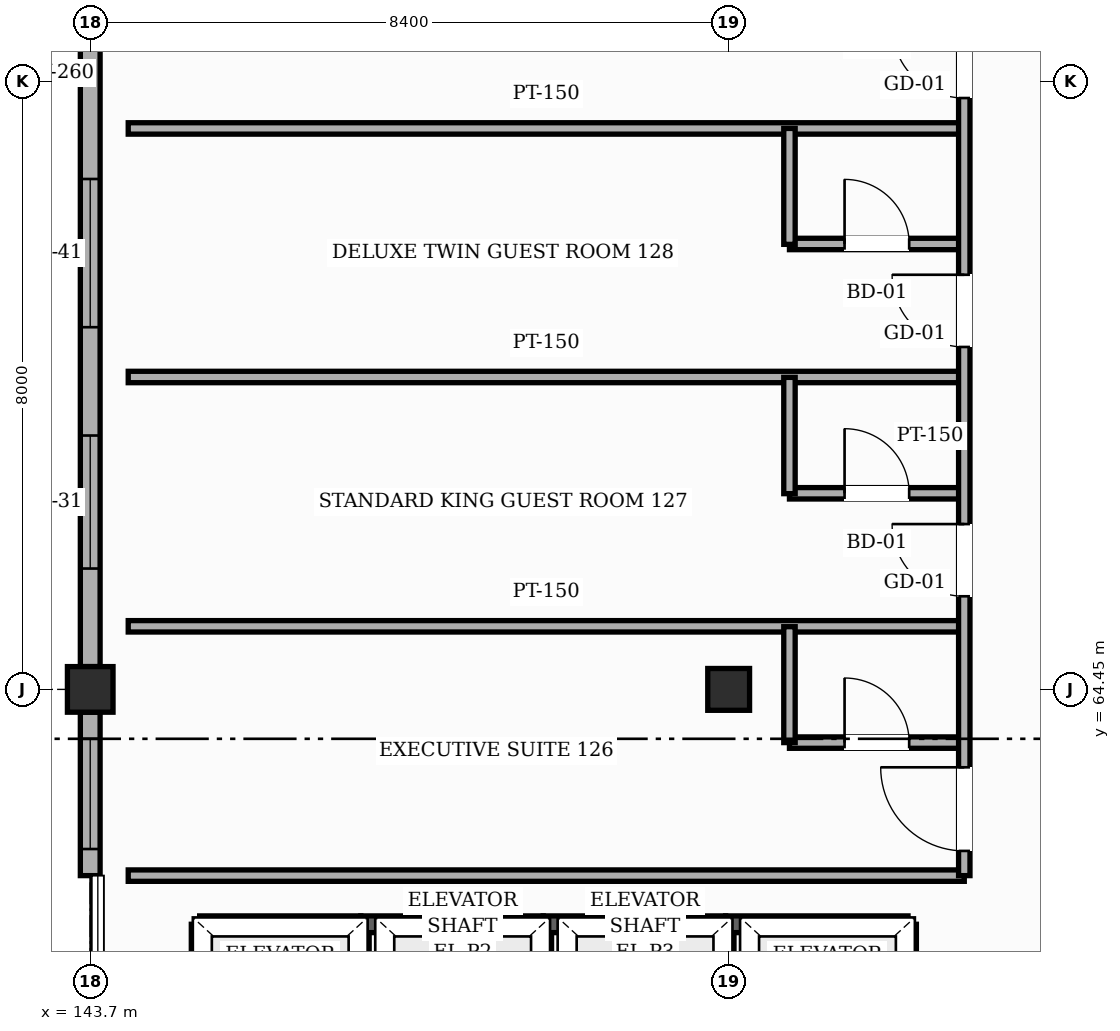
"""IFC4 building model, lengths in metres.
Left out: names, types, materials, properties, quantities, classifications, styles, units other than length and angle.
Written with IfcOpenShell. Run it as: python <this file> out.ifc"""

import sys

from ifc_helpers import new_model, si_unit, direction, frame, frame_2d, origin, origin_2d, place, context, subcontext, project, spatial, rectangle, hollow_rectangle, extrude, element, fill, save


model = new_model("IFC4")
c1 = context("Model", 3, precision=1e-05, world=origin(), true_north=direction((0.0, 1.0)))
c2 = subcontext(c1, "Body", "Model", "MODEL_VIEW")
j1 = project(units=[si_unit("LENGTHUNIT", "METRE"), si_unit("PLANEANGLEUNIT", "RADIAN")], contexts=[c1])
p1 = place(None, origin())
s1 = spatial("IfcSite", under=j1, at=p1, CompositionType="ELEMENT")
p2 = place(p1, origin())
s2 = spatial("IfcBuilding", under=s1, at=p2, CompositionType="ELEMENT")
p3 = place(p2, frame((0.0, 0.0, 28.2)))
s3 = spatial("IfcBuildingStorey", under=s2, at=p3, CompositionType="ELEMENT", Elevation=28.2)
p4 = place(p3, frame((143.7, 64.45, 0.0), z_axis=(0.0, 0.0, 1.0), x_axis=(1.0, 0.0, 0.0)))
e1 = element("IfcColumn", 1, at=p4, inside=s3, PredefinedType="COLUMN", context=c2, shape_type="SweptSolid", body=[
    extrude(hollow_rectangle(XDim=0.6, YDim=0.6, WallThickness=0.025, InnerFilletRadius=0.025, OuterFilletRadius=0.05, at=origin_2d()), origin(), (0.0, 0.0, 1.0), 3.6),
])
p5 = place(p3, frame((152.1, 64.45, 0.0), z_axis=(0.0, 0.0, 1.0), x_axis=(1.0, 0.0, 0.0)))
e2 = element("IfcColumn", 2, at=p5, inside=s3, PredefinedType="COLUMN", context=c2, shape_type="SweptSolid", body=[
    extrude(hollow_rectangle(XDim=0.55, YDim=0.55, WallThickness=0.022, InnerFilletRadius=0.022, OuterFilletRadius=0.044, at=origin_2d()), origin(), (0.0, 0.0, 1.0), 3.6),
])
p6 = place(p3, frame((143.7, 62.0, 0.0), z_axis=(0.0, 0.0, 1.0), x_axis=(0.0, 1.0, 0.0)))
e3 = element("IfcWall", 3, at=p6, inside=s3, PredefinedType="SOLIDWALL", context=c2, shape_type="SweptSolid", body=[
    extrude(rectangle(XDim=2.15, YDim=0.26, at=frame_2d((1.075, 0.0))), origin(), (0.0, 0.0, 1.0), 2.805),
])
p7 = place(p6, frame((0.35, 0.0, 0.85)))
e4 = element("IfcOpeningElement", 4, at=p7, cuts=e3, PredefinedType="OPENING", context=c2, shape_type="SweptSolid", body=[
    extrude(rectangle(XDim=1.45, YDim=1.65, at=frame_2d((0.725, 0.825))), frame((0.0, 0.14, 0.0), z_axis=(0.0, -1.0, 0.0), x_axis=(1.0, 0.0, 0.0)), (0.0, 0.0, 1.0), 0.28),
])
p8 = place(p3, frame((143.7, 64.75, 0.0), z_axis=(0.0, 0.0, 1.0), x_axis=(0.0, 1.0, 0.0)))
e5 = element("IfcWall", 5, at=p8, inside=s3, PredefinedType="SOLIDWALL", context=c2, shape_type="SweptSolid", body=[
    extrude(rectangle(XDim=8.3, YDim=0.26, at=frame_2d((4.15, 0.0))), origin(), (0.0, 0.0, 1.0), 2.655),
])
p9 = place(p8, frame((1.29, 0.0, 0.85)))
e6 = element("IfcOpeningElement", 6, at=p9, cuts=e5, PredefinedType="OPENING", context=c2, shape_type="SweptSolid", body=[
    extrude(rectangle(XDim=1.75, YDim=1.35, at=frame_2d((0.875, 0.675))), frame((0.0, 0.14, 0.0), z_axis=(0.0, -1.0, 0.0), x_axis=(1.0, 0.0, 0.0)), (0.0, 0.0, 1.0), 0.28),
])
p10 = place(p8, frame((4.465, 0.0, 0.85)))
e7 = element("IfcOpeningElement", 7, at=p10, cuts=e5, PredefinedType="OPENING", context=c2, shape_type="SweptSolid", body=[
    extrude(rectangle(XDim=1.95, YDim=1.35, at=frame_2d((0.975, 0.675))), frame((0.0, 0.14, 0.0), z_axis=(0.0, -1.0, 0.0), x_axis=(1.0, 0.0, 0.0)), (0.0, 0.0, 1.0), 0.28),
])
p11 = place(p3, frame((145.14, 61.36, 0.0), z_axis=(0.0, 0.0, 1.0), x_axis=(1.0, 0.0, 0.0)))
e8 = element("IfcWall", 8, at=p11, inside=s3, PredefinedType="SHEAR", context=c2, shape_type="SweptSolid", body=[
    extrude(rectangle(XDim=2.12, YDim=0.22, at=frame_2d((1.06, 0.0))), origin(), (0.0, 0.0, 1.0), 3.38),
])
for number, where, z_axis, x_axis in (
    (9, (147.26, 59.44, 0.0), (0.0, 0.0, 1.0), (0.0, 1.0, 0.0)),
    (10, (145.14, 59.44, 0.0), (0.0, 0.0, 1.0), (0.0, 1.0, 0.0)),
):
    element("IfcWall", number, at=place(p3, frame(where, z_axis=z_axis, x_axis=x_axis)), inside=s3, PredefinedType="SHEAR", context=c2, shape_type="SweptSolid", body=[
        extrude(rectangle(XDim=1.92, YDim=0.22, at=frame_2d((0.96, 0.0))), origin(), (0.0, 0.0, 1.0), 3.38),
    ])
p12 = place(p3, frame((147.26, 61.36, 0.0), z_axis=(0.0, 0.0, 1.0), x_axis=(1.0, 0.0, 0.0)))
e11 = element("IfcWall", 11, at=p12, inside=s3, PredefinedType="SHEAR", context=c2, shape_type="SweptSolid", body=[
    extrude(rectangle(XDim=2.4, YDim=0.22, at=frame_2d((1.2, 0.0))), origin(), (0.0, 0.0, 1.0), 3.38),
])
p13 = place(p3, frame((149.66, 59.44, 0.0), z_axis=(0.0, 0.0, 1.0), x_axis=(0.0, 1.0, 0.0)))
e12 = element("IfcWall", 12, at=p13, inside=s3, PredefinedType="SHEAR", context=c2, shape_type="SweptSolid", body=[
    extrude(rectangle(XDim=1.92, YDim=0.22, at=frame_2d((0.96, 0.0))), origin(), (0.0, 0.0, 1.0), 3.38),
])
p14 = place(p3, frame((149.66, 61.36, 0.0), z_axis=(0.0, 0.0, 1.0), x_axis=(1.0, 0.0, 0.0)))
e13 = element("IfcWall", 13, at=p14, inside=s3, PredefinedType="SHEAR", context=c2, shape_type="SweptSolid", body=[
    extrude(rectangle(XDim=2.4, YDim=0.22, at=frame_2d((1.2, 0.0))), origin(), (0.0, 0.0, 1.0), 3.38),
])
p15 = place(p3, frame((152.06, 59.44, 0.0), z_axis=(0.0, 0.0, 1.0), x_axis=(0.0, 1.0, 0.0)))
e14 = element("IfcWall", 14, at=p15, inside=s3, PredefinedType="SHEAR", context=c2, shape_type="SweptSolid", body=[
    extrude(rectangle(XDim=1.92, YDim=0.22, at=frame_2d((0.96, 0.0))), origin(), (0.0, 0.0, 1.0), 3.38),
])
p16 = place(p3, frame((152.06, 61.36, 0.0), z_axis=(0.0, 0.0, 1.0), x_axis=(1.0, 0.0, 0.0)))
e15 = element("IfcWall", 15, at=p16, inside=s3, PredefinedType="SHEAR", context=c2, shape_type="SweptSolid", body=[
    extrude(rectangle(XDim=2.4, YDim=0.22, at=frame_2d((1.2, 0.0))), origin(), (0.0, 0.0, 1.0), 3.38),
])
p17 = place(p3, frame((154.46, 59.44, 0.0), z_axis=(0.0, 0.0, 1.0), x_axis=(0.0, 1.0, 0.0)))
e16 = element("IfcWall", 16, at=p17, inside=s3, PredefinedType="SHEAR", context=c2, shape_type="SweptSolid", body=[
    extrude(rectangle(XDim=1.92, YDim=0.22, at=frame_2d((0.96, 0.0))), origin(), (0.0, 0.0, 1.0), 3.38),
])
p18 = place(p3, frame((144.2, 62.0, 0.0), z_axis=(0.0, 0.0, 1.0), x_axis=(1.0, 0.0, 0.0)))
e17 = element("IfcWall", 17, at=p18, inside=s3, PredefinedType="PARTITIONING", context=c2, shape_type="SweptSolid", body=[
    extrude(rectangle(XDim=11.0, YDim=0.15, at=frame_2d((5.5, 0.0))), origin(), (0.0, 0.0, 1.0), 3.365),
])
p19 = place(p3, frame((152.9, 63.75, 0.0), z_axis=(0.0, 0.0, 1.0), x_axis=(1.0, 0.0, 0.0)))
e18 = element("IfcWall", 18, at=p19, inside=s3, PredefinedType="PARTITIONING", context=c2, shape_type="SweptSolid", body=[
    extrude(rectangle(XDim=2.3, YDim=0.15, at=frame_2d((1.15, 0.0))), origin(), (0.0, 0.0, 1.0), 3.365),
])
p20 = place(p19, frame((0.725, 0.0, 0.0)))
e19 = element("IfcOpeningElement", 19, at=p20, cuts=e18, PredefinedType="OPENING", context=c2, shape_type="SweptSolid", body=[
    extrude(rectangle(XDim=0.85, YDim=2.1, at=frame_2d((0.425, 1.05))), frame((0.0, 0.085, 0.0), z_axis=(0.0, -1.0, 0.0), x_axis=(1.0, 0.0, 0.0)), (0.0, 0.0, 1.0), 0.17),
])
p21 = place(p3, frame((144.2, 65.28, 0.0), z_axis=(0.0, 0.0, 1.0), x_axis=(1.0, 0.0, 0.0)))
e20 = element("IfcWall", 20, at=p21, inside=s3, PredefinedType="PARTITIONING", context=c2, shape_type="SweptSolid", body=[
    extrude(rectangle(XDim=11.0, YDim=0.15, at=frame_2d((5.5, 0.0))), origin(), (0.0, 0.0, 1.0), 3.365),
])
p22 = place(p3, frame((152.9, 67.03, 0.0), z_axis=(0.0, 0.0, 1.0), x_axis=(1.0, 0.0, 0.0)))
e21 = element("IfcWall", 21, at=p22, inside=s3, PredefinedType="PARTITIONING", context=c2, shape_type="SweptSolid", body=[
    extrude(rectangle(XDim=2.3, YDim=0.15, at=frame_2d((1.15, 0.0))), origin(), (0.0, 0.0, 1.0), 3.365),
])
p23 = place(p22, frame((0.725, 0.0, 0.0)))
e22 = element("IfcOpeningElement", 22, at=p23, cuts=e21, PredefinedType="OPENING", context=c2, shape_type="SweptSolid", body=[
    extrude(rectangle(XDim=0.85, YDim=2.1, at=frame_2d((0.425, 1.05))), frame((0.0, 0.085, 0.0), z_axis=(0.0, -1.0, 0.0), x_axis=(1.0, 0.0, 0.0)), (0.0, 0.0, 1.0), 0.17),
])
p24 = place(p3, frame((144.2, 68.56, 0.0), z_axis=(0.0, 0.0, 1.0), x_axis=(1.0, 0.0, 0.0)))
e23 = element("IfcWall", 23, at=p24, inside=s3, PredefinedType="PARTITIONING", context=c2, shape_type="SweptSolid", body=[
    extrude(rectangle(XDim=11.0, YDim=0.15, at=frame_2d((5.5, 0.0))), origin(), (0.0, 0.0, 1.0), 3.365),
])
p25 = place(p3, frame((152.9, 70.31, 0.0), z_axis=(0.0, 0.0, 1.0), x_axis=(1.0, 0.0, 0.0)))
e24 = element("IfcWall", 24, at=p25, inside=s3, PredefinedType="PARTITIONING", context=c2, shape_type="SweptSolid", body=[
    extrude(rectangle(XDim=2.3, YDim=0.15, at=frame_2d((1.15, 0.0))), origin(), (0.0, 0.0, 1.0), 3.365),
])
p26 = place(p25, frame((0.725, 0.0, 0.0)))
e25 = element("IfcOpeningElement", 25, at=p26, cuts=e24, PredefinedType="OPENING", context=c2, shape_type="SweptSolid", body=[
    extrude(rectangle(XDim=0.85, YDim=2.1, at=frame_2d((0.425, 1.05))), frame((0.0, 0.085, 0.0), z_axis=(0.0, -1.0, 0.0), x_axis=(1.0, 0.0, 0.0)), (0.0, 0.0, 1.0), 0.17),
])
p27 = place(p3, frame((144.2, 71.83, 0.0), z_axis=(0.0, 0.0, 1.0), x_axis=(1.0, 0.0, 0.0)))
e26 = element("IfcWall", 26, at=p27, inside=s3, PredefinedType="PARTITIONING", context=c2, shape_type="SweptSolid", body=[
    extrude(rectangle(XDim=11.0, YDim=0.15, at=frame_2d((5.5, 0.0))), origin(), (0.0, 0.0, 1.0), 3.365),
])
p28 = place(p3, frame((152.9, 63.75, 0.0), z_axis=(0.0, 0.0, 1.0), x_axis=(0.0, 1.0, 0.0)))
e27 = element("IfcWall", 27, at=p28, inside=s3, PredefinedType="PARTITIONING", context=c2, shape_type="SweptSolid", body=[
    extrude(rectangle(XDim=1.525, YDim=0.15, at=frame_2d((0.762, 0.0))), origin(), (0.0, 0.0, 1.0), 3.365),
])
p29 = place(p3, frame((152.9, 67.025, 0.0), z_axis=(0.0, 0.0, 1.0), x_axis=(0.0, 1.0, 0.0)))
e28 = element("IfcWall", 28, at=p29, inside=s3, PredefinedType="PARTITIONING", context=c2, shape_type="SweptSolid", body=[
    extrude(rectangle(XDim=1.53, YDim=0.15, at=frame_2d((0.765, 0.0))), origin(), (0.0, 0.0, 1.0), 3.365),
])
p30 = place(p3, frame((152.9, 70.305, 0.0), z_axis=(0.0, 0.0, 1.0), x_axis=(0.0, 1.0, 0.0)))
e29 = element("IfcWall", 29, at=p30, inside=s3, PredefinedType="PARTITIONING", context=c2, shape_type="SweptSolid", body=[
    extrude(rectangle(XDim=1.525, YDim=0.15, at=frame_2d((0.763, 0.0))), origin(), (0.0, 0.0, 1.0), 3.365),
])
p31 = place(p3, frame((155.2, 62.0, 0.0), z_axis=(0.0, 0.0, 1.0), x_axis=(0.0, 1.0, 0.0)))
e30 = element("IfcWall", 30, at=p31, inside=s3, PredefinedType="PARTITIONING", context=c2, shape_type="SweptSolid", body=[
    extrude(rectangle(XDim=42.6, YDim=0.15, at=frame_2d((21.3, 0.0))), origin(), (0.0, 0.0, 1.0), 3.365),
])
p32 = place(p31, frame((0.325, 0.0, 0.0)))
e31 = element("IfcOpeningElement", 31, at=p32, cuts=e30, PredefinedType="OPENING", context=c2, shape_type="SweptSolid", body=[
    extrude(rectangle(XDim=1.1, YDim=2.2, at=frame_2d((0.55, 1.1))), frame((0.0, 0.085, 0.0), z_axis=(0.0, -1.0, 0.0), x_axis=(1.0, 0.0, 0.0)), (0.0, 0.0, 1.0), 0.17),
])
p33 = place(p31, frame((3.675, 0.0, 0.0)))
e32 = element("IfcOpeningElement", 32, at=p33, cuts=e30, PredefinedType="OPENING", context=c2, shape_type="SweptSolid", body=[
    extrude(rectangle(XDim=0.95, YDim=2.15, at=frame_2d((0.475, 1.075))), frame((0.0, 0.085, 0.0), z_axis=(0.0, -1.0, 0.0), x_axis=(1.0, 0.0, 0.0)), (0.0, 0.0, 1.0), 0.17),
])
p34 = place(p31, frame((6.955, 0.0, 0.0)))
e33 = element("IfcOpeningElement", 33, at=p34, cuts=e30, PredefinedType="OPENING", context=c2, shape_type="SweptSolid", body=[
    extrude(rectangle(XDim=0.95, YDim=2.15, at=frame_2d((0.475, 1.075))), frame((0.0, 0.085, 0.0), z_axis=(0.0, -1.0, 0.0), x_axis=(1.0, 0.0, 0.0)), (0.0, 0.0, 1.0), 0.17),
])
p35 = place(p31, frame((10.23, 0.0, 0.0)))
e34 = element("IfcOpeningElement", 34, at=p35, cuts=e30, PredefinedType="OPENING", context=c2, shape_type="SweptSolid", body=[
    extrude(rectangle(XDim=0.95, YDim=2.15, at=frame_2d((0.475, 1.075))), frame((0.0, 0.085, 0.0), z_axis=(0.0, -1.0, 0.0), x_axis=(1.0, 0.0, 0.0)), (0.0, 0.0, 1.0), 0.17),
])
p36 = place(p31, frame((13.51, 0.0, 0.0)))
e35 = element("IfcOpeningElement", 35, at=p36, cuts=e30, PredefinedType="OPENING", context=c2, shape_type="SweptSolid", body=[
    extrude(rectangle(XDim=0.95, YDim=2.15, at=frame_2d((0.475, 1.075))), frame((0.0, 0.085, 0.0), z_axis=(0.0, -1.0, 0.0), x_axis=(1.0, 0.0, 0.0)), (0.0, 0.0, 1.0), 0.17),
])
p37 = place(p31, frame((16.785, 0.0, 0.0)))
e36 = element("IfcOpeningElement", 36, at=p37, cuts=e30, PredefinedType="OPENING", context=c2, shape_type="SweptSolid", body=[
    extrude(rectangle(XDim=0.95, YDim=2.15, at=frame_2d((0.475, 1.075))), frame((0.0, 0.085, 0.0), z_axis=(0.0, -1.0, 0.0), x_axis=(1.0, 0.0, 0.0)), (0.0, 0.0, 1.0), 0.17),
])
p38 = place(p31, frame((20.06, 0.0, 0.0)))
e37 = element("IfcOpeningElement", 37, at=p38, cuts=e30, PredefinedType="OPENING", context=c2, shape_type="SweptSolid", body=[
    extrude(rectangle(XDim=0.95, YDim=2.15, at=frame_2d((0.475, 1.075))), frame((0.0, 0.085, 0.0), z_axis=(0.0, -1.0, 0.0), x_axis=(1.0, 0.0, 0.0)), (0.0, 0.0, 1.0), 0.17),
])
p39 = place(p31, frame((23.34, 0.0, 0.0)))
e38 = element("IfcOpeningElement", 38, at=p39, cuts=e30, PredefinedType="OPENING", context=c2, shape_type="SweptSolid", body=[
    extrude(rectangle(XDim=0.95, YDim=2.15, at=frame_2d((0.475, 1.075))), frame((0.0, 0.085, 0.0), z_axis=(0.0, -1.0, 0.0), x_axis=(1.0, 0.0, 0.0)), (0.0, 0.0, 1.0), 0.17),
])
p40 = place(p31, frame((26.615, 0.0, 0.0)))
e39 = element("IfcOpeningElement", 39, at=p40, cuts=e30, PredefinedType="OPENING", context=c2, shape_type="SweptSolid", body=[
    extrude(rectangle(XDim=0.95, YDim=2.15, at=frame_2d((0.475, 1.075))), frame((0.0, 0.085, 0.0), z_axis=(0.0, -1.0, 0.0), x_axis=(1.0, 0.0, 0.0)), (0.0, 0.0, 1.0), 0.17),
])
p41 = place(p31, frame((29.89, 0.0, 0.0)))
e40 = element("IfcOpeningElement", 40, at=p41, cuts=e30, PredefinedType="OPENING", context=c2, shape_type="SweptSolid", body=[
    extrude(rectangle(XDim=0.95, YDim=2.15, at=frame_2d((0.475, 1.075))), frame((0.0, 0.085, 0.0), z_axis=(0.0, -1.0, 0.0), x_axis=(1.0, 0.0, 0.0)), (0.0, 0.0, 1.0), 0.17),
])
p42 = place(p31, frame((33.17, 0.0, 0.0)))
e41 = element("IfcOpeningElement", 41, at=p42, cuts=e30, PredefinedType="OPENING", context=c2, shape_type="SweptSolid", body=[
    extrude(rectangle(XDim=0.95, YDim=2.15, at=frame_2d((0.475, 1.075))), frame((0.0, 0.085, 0.0), z_axis=(0.0, -1.0, 0.0), x_axis=(1.0, 0.0, 0.0)), (0.0, 0.0, 1.0), 0.17),
])
p43 = place(p31, frame((36.445, 0.0, 0.0)))
e42 = element("IfcOpeningElement", 42, at=p43, cuts=e30, PredefinedType="OPENING", context=c2, shape_type="SweptSolid", body=[
    extrude(rectangle(XDim=0.95, YDim=2.15, at=frame_2d((0.475, 1.075))), frame((0.0, 0.085, 0.0), z_axis=(0.0, -1.0, 0.0), x_axis=(1.0, 0.0, 0.0)), (0.0, 0.0, 1.0), 0.17),
])
p44 = place(p31, frame((39.725, 0.0, 0.0)))
e43 = element("IfcOpeningElement", 43, at=p44, cuts=e30, PredefinedType="OPENING", context=c2, shape_type="SweptSolid", body=[
    extrude(rectangle(XDim=0.95, YDim=2.15, at=frame_2d((0.475, 1.075))), frame((0.0, 0.085, 0.0), z_axis=(0.0, -1.0, 0.0), x_axis=(1.0, 0.0, 0.0)), (0.0, 0.0, 1.0), 0.17),
])
p45 = place(p7, origin())
e44 = element("IfcWindow", 44, at=p45, inside=s3, PartitioningType="SINGLE_PANEL", PredefinedType="WINDOW", context=c2, shape_type="SweptSolid", body=[
    extrude(rectangle(XDim=1.45, YDim=1.65, at=frame_2d((0.725, 0.825))), frame((0.0, 0.03, 0.0), z_axis=(0.0, -1.0, 0.0), x_axis=(1.0, 0.0, 0.0)), (0.0, 0.0, 1.0), 0.06),
])
fill(e4, e44)
p46 = place(p9, origin())
e45 = element("IfcWindow", 45, at=p46, inside=s3, PartitioningType="SINGLE_PANEL", PredefinedType="WINDOW", context=c2, shape_type="SweptSolid", body=[
    extrude(rectangle(XDim=1.75, YDim=1.35, at=frame_2d((0.875, 0.675))), frame((0.0, 0.03, 0.0), z_axis=(0.0, -1.0, 0.0), x_axis=(1.0, 0.0, 0.0)), (0.0, 0.0, 1.0), 0.06),
])
fill(e6, e45)
p47 = place(p10, origin())
e46 = element("IfcWindow", 46, at=p47, inside=s3, PartitioningType="SINGLE_PANEL", PredefinedType="WINDOW", context=c2, shape_type="SweptSolid", body=[
    extrude(rectangle(XDim=1.95, YDim=1.35, at=frame_2d((0.975, 0.675))), frame((0.0, 0.03, 0.0), z_axis=(0.0, -1.0, 0.0), x_axis=(1.0, 0.0, 0.0)), (0.0, 0.0, 1.0), 0.06),
])
fill(e7, e46)
p48 = place(p32, origin())
e47 = element("IfcDoor", 47, at=p48, inside=s3, OperationType="SINGLE_SWING_RIGHT", PredefinedType="DOOR", context=c2, shape_type="SweptSolid", body=[
    extrude(rectangle(XDim=1.1, YDim=2.2, at=frame_2d((0.55, 1.1))), frame((0.0, 0.025, 0.0), z_axis=(0.0, -1.0, 0.0), x_axis=(1.0, 0.0, 0.0)), (0.0, 0.0, 1.0), 0.05),
])
fill(e31, e47)
p49 = place(p20, origin())
e48 = element("IfcDoor", 48, at=p49, inside=s3, OperationType="SINGLE_SWING_LEFT", PredefinedType="DOOR", context=c2, shape_type="SweptSolid", body=[
    extrude(rectangle(XDim=0.85, YDim=2.1, at=frame_2d((0.425, 1.05))), frame((0.0, 0.025, 0.0), z_axis=(0.0, -1.0, 0.0), x_axis=(1.0, 0.0, 0.0)), (0.0, 0.0, 1.0), 0.05),
])
fill(e19, e48)
p50 = place(p33, origin())
e49 = element("IfcDoor", 49, at=p50, inside=s3, OperationType="SINGLE_SWING_RIGHT", PredefinedType="DOOR", context=c2, shape_type="SweptSolid", body=[
    extrude(rectangle(XDim=0.95, YDim=2.15, at=frame_2d((0.475, 1.075))), frame((0.0, 0.025, 0.0), z_axis=(0.0, -1.0, 0.0), x_axis=(1.0, 0.0, 0.0)), (0.0, 0.0, 1.0), 0.05),
])
fill(e32, e49)
p51 = place(p23, origin())
e50 = element("IfcDoor", 50, at=p51, inside=s3, OperationType="SINGLE_SWING_LEFT", PredefinedType="DOOR", context=c2, shape_type="SweptSolid", body=[
    extrude(rectangle(XDim=0.85, YDim=2.1, at=frame_2d((0.425, 1.05))), frame((0.0, 0.025, 0.0), z_axis=(0.0, -1.0, 0.0), x_axis=(1.0, 0.0, 0.0)), (0.0, 0.0, 1.0), 0.05),
])
fill(e22, e50)
p52 = place(p34, origin())
e51 = element("IfcDoor", 51, at=p52, inside=s3, OperationType="SINGLE_SWING_RIGHT", PredefinedType="DOOR", context=c2, shape_type="SweptSolid", body=[
    extrude(rectangle(XDim=0.95, YDim=2.15, at=frame_2d((0.475, 1.075))), frame((0.0, 0.025, 0.0), z_axis=(0.0, -1.0, 0.0), x_axis=(1.0, 0.0, 0.0)), (0.0, 0.0, 1.0), 0.05),
])
fill(e33, e51)
p53 = place(p26, origin())
e52 = element("IfcDoor", 52, at=p53, inside=s3, OperationType="SINGLE_SWING_LEFT", PredefinedType="DOOR", context=c2, shape_type="SweptSolid", body=[
    extrude(rectangle(XDim=0.85, YDim=2.1, at=frame_2d((0.425, 1.05))), frame((0.0, 0.025, 0.0), z_axis=(0.0, -1.0, 0.0), x_axis=(1.0, 0.0, 0.0)), (0.0, 0.0, 1.0), 0.05),
])
fill(e25, e52)
p54 = place(p35, origin())
e53 = element("IfcDoor", 53, at=p54, inside=s3, OperationType="SINGLE_SWING_RIGHT", PredefinedType="DOOR", context=c2, shape_type="SweptSolid", body=[
    extrude(rectangle(XDim=0.95, YDim=2.15, at=frame_2d((0.475, 1.075))), frame((0.0, 0.025, 0.0), z_axis=(0.0, -1.0, 0.0), x_axis=(1.0, 0.0, 0.0)), (0.0, 0.0, 1.0), 0.05),
])
fill(e34, e53)
save(model, sys.argv[1])
